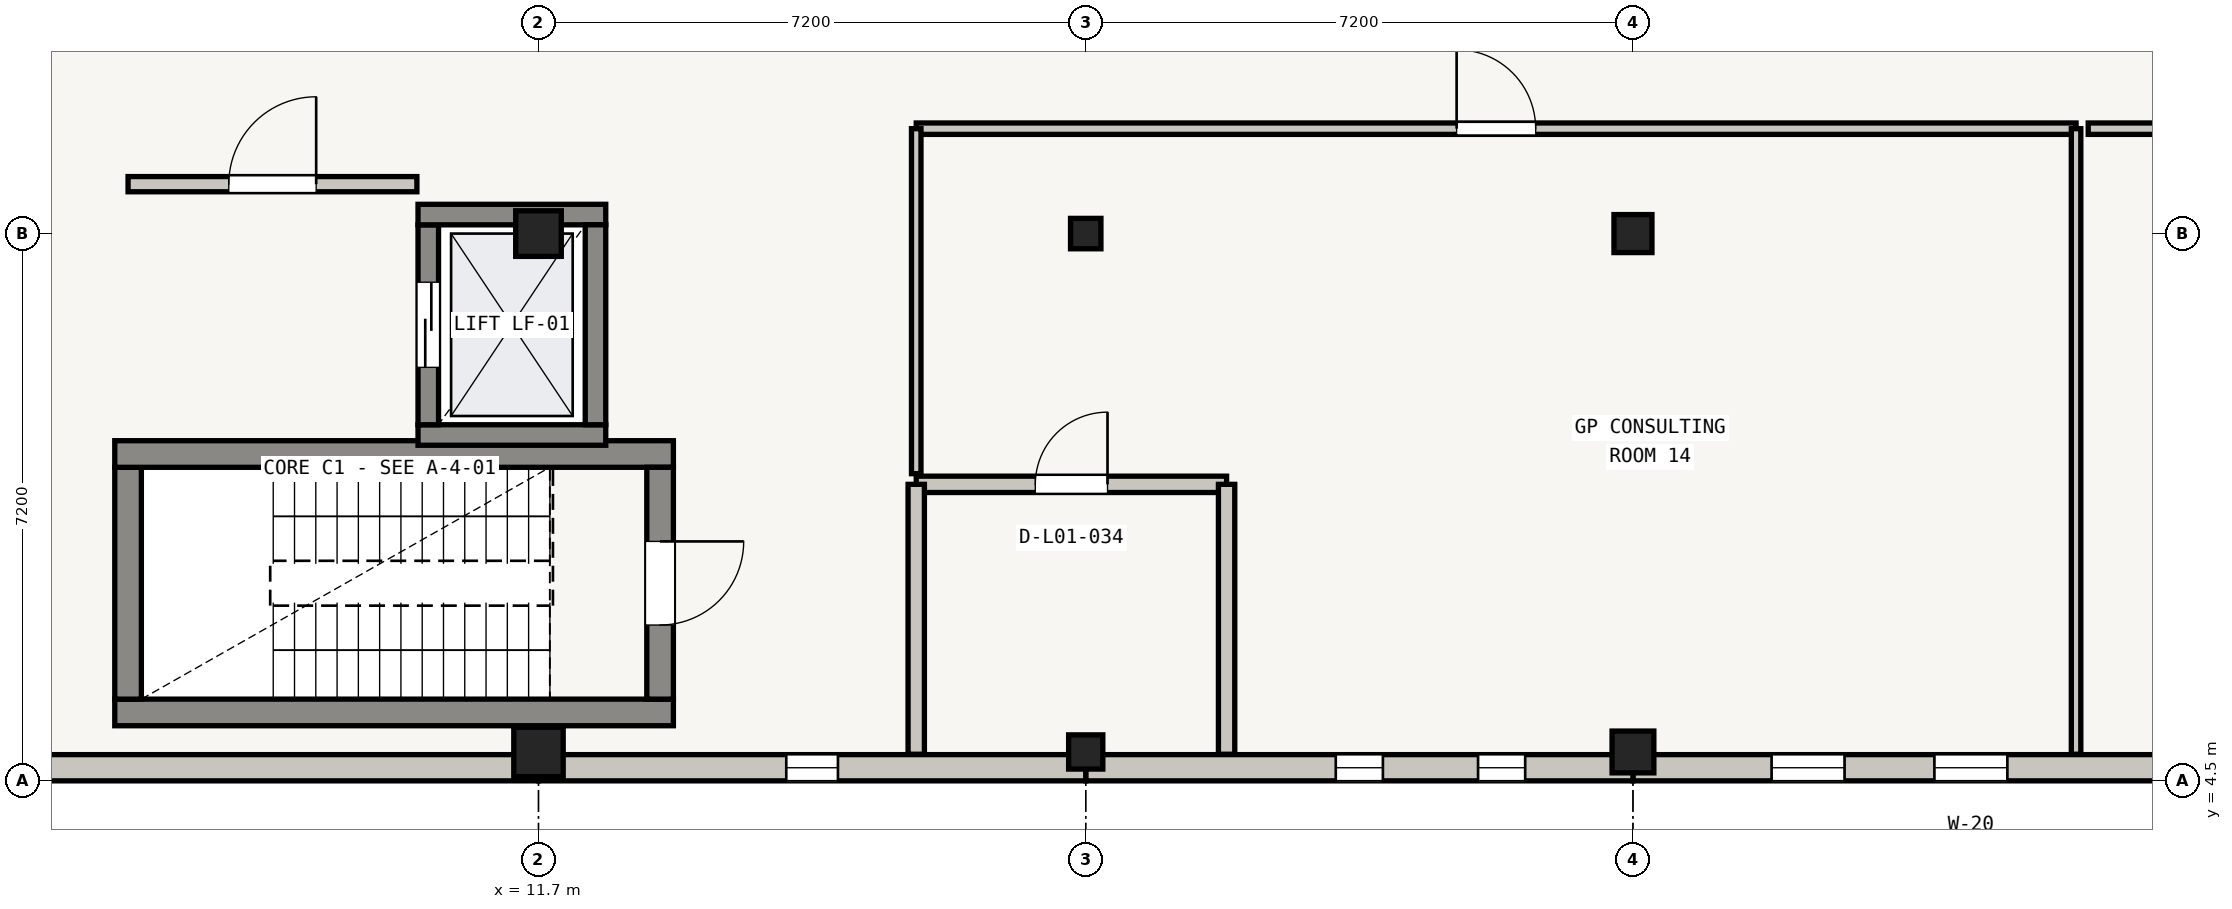
"""IFC4 building model, lengths in metres.
Left out: names, types, materials, properties, quantities, classifications, styles, units other than length and angle.
Written with IfcOpenShell. Run it as: python <this file> out.ifc"""

import sys

from ifc_helpers import new_model, si_unit, direction, frame, frame_2d, origin, origin_2d, place, context, subcontext, project, spatial, rectangle, extrude, element, fill, save


model = new_model("IFC4")
c1 = context("Model", 3, precision=1e-05, world=origin(), true_north=direction((0.0, 1.0)))
c2 = subcontext(c1, "Body", "Model", "MODEL_VIEW")
j1 = project(units=[si_unit("LENGTHUNIT", "METRE"), si_unit("PLANEANGLEUNIT", "RADIAN")], contexts=[c1])
p1 = place(None, origin())
s1 = spatial("IfcSite", under=j1, at=p1, CompositionType="ELEMENT")
p2 = place(p1, origin())
s2 = spatial("IfcBuilding", under=s1, at=p2, CompositionType="ELEMENT")
p3 = place(p2, frame((0.0, 0.0, 4.5)))
s3 = spatial("IfcBuildingStorey", under=s2, at=p3, CompositionType="ELEMENT", Elevation=4.5)
p4 = place(p3, frame((11.7, 4.88, 0.0), z_axis=(0.0, 0.0, 1.0), x_axis=(1.0, 0.0, 0.0)))
e1 = element("IfcColumn", 1, at=p4, inside=s3, PredefinedType="COLUMN", context=c2, shape_type="SweptSolid", body=[
    extrude(rectangle(XDim=0.65, YDim=0.65, at=origin_2d()), origin(), (0.0, 0.0, 1.0), 3.92),
])
p5 = place(p3, frame((11.7, 11.7, 0.0), z_axis=(0.0, 0.0, 1.0), x_axis=(1.0, 0.0, 0.0)))
e2 = element("IfcColumn", 2, at=p5, inside=s3, PredefinedType="COLUMN", context=c2, shape_type="SweptSolid", body=[
    extrude(rectangle(XDim=0.6, YDim=0.6, at=origin_2d()), origin(), (0.0, 0.0, 1.0), 3.92),
])
p6 = place(p3, frame((18.9, 4.88, 0.0), z_axis=(0.0, 0.0, 1.0), x_axis=(1.0, 0.0, 0.0)))
e3 = element("IfcColumn", 3, at=p6, inside=s3, PredefinedType="COLUMN", context=c2, shape_type="SweptSolid", body=[
    extrude(rectangle(XDim=0.45, YDim=0.45, at=origin_2d()), origin(), (0.0, 0.0, 1.0), 3.92),
])
p7 = place(p3, frame((18.9, 11.7, 0.0), z_axis=(0.0, 0.0, 1.0), x_axis=(1.0, 0.0, 0.0)))
e4 = element("IfcColumn", 4, at=p7, inside=s3, PredefinedType="COLUMN", context=c2, shape_type="SweptSolid", body=[
    extrude(rectangle(XDim=0.4, YDim=0.4, at=origin_2d()), origin(), (0.0, 0.0, 1.0), 3.92),
])
p8 = place(p3, frame((26.1, 4.88, 0.0), z_axis=(0.0, 0.0, 1.0), x_axis=(1.0, 0.0, 0.0)))
e5 = element("IfcColumn", 5, at=p8, inside=s3, PredefinedType="COLUMN", context=c2, shape_type="SweptSolid", body=[
    extrude(rectangle(XDim=0.55, YDim=0.55, at=origin_2d()), origin(), (0.0, 0.0, 1.0), 3.92),
])
p9 = place(p3, frame((26.1, 11.7, 0.0), z_axis=(0.0, 0.0, 1.0), x_axis=(1.0, 0.0, 0.0)))
e6 = element("IfcColumn", 6, at=p9, inside=s3, PredefinedType="COLUMN", context=c2, shape_type="SweptSolid", body=[
    extrude(rectangle(XDim=0.5, YDim=0.5, at=origin_2d()), origin(), (0.0, 0.0, 1.0), 3.92),
])
p10 = place(p3, frame((33.3, 4.673, 0.0), z_axis=(0.0, 0.0, 1.0), x_axis=(-1.0, 0.0, 0.0)))
e7 = element("IfcWall", 7, at=p10, inside=s3, PredefinedType="SOLIDWALL", context=c2, shape_type="SweptSolid", body=[
    extrude(rectangle(XDim=7.2, YDim=0.345, at=frame_2d((3.6, 0.0))), origin(), (0.0, 0.0, 1.0), 3.185),
])
p11 = place(p10, frame((2.274, 0.0, 0.55)))
e8 = element("IfcOpeningElement", 8, at=p11, cuts=e7, PredefinedType="OPENING", context=c2, shape_type="SweptSolid", body=[
    extrude(rectangle(XDim=0.96, YDim=2.1, at=frame_2d((0.48, 1.05))), frame((0.0, 0.172, 0.0), z_axis=(0.0, -1.0, 0.0), x_axis=(1.0, 0.0, 0.0)), (0.0, 0.0, 1.0), 0.345),
])
p12 = place(p10, frame((4.416, 0.0, 0.55)))
e9 = element("IfcOpeningElement", 9, at=p12, cuts=e7, PredefinedType="OPENING", context=c2, shape_type="SweptSolid", body=[
    extrude(rectangle(XDim=0.96, YDim=2.1, at=frame_2d((0.48, 1.05))), frame((0.0, 0.172, 0.0), z_axis=(0.0, -1.0, 0.0), x_axis=(1.0, 0.0, 0.0)), (0.0, 0.0, 1.0), 0.345),
])
p13 = place(p3, frame((26.1, 4.673, 0.0), z_axis=(0.0, 0.0, 1.0), x_axis=(-1.0, 0.0, 0.0)))
e10 = element("IfcWall", 10, at=p13, inside=s3, PredefinedType="SOLIDWALL", context=c2, shape_type="SweptSolid", body=[
    extrude(rectangle(XDim=7.2, YDim=0.345, at=frame_2d((3.6, 0.0))), origin(), (0.0, 0.0, 1.0), 3.185),
])
p14 = place(p13, frame((1.418, 0.0, 0.55)))
e11 = element("IfcOpeningElement", 11, at=p14, cuts=e10, PredefinedType="OPENING", context=c2, shape_type="SweptSolid", body=[
    extrude(rectangle(XDim=0.62, YDim=2.08, at=frame_2d((0.31, 1.04))), frame((0.0, 0.172, 0.0), z_axis=(0.0, -1.0, 0.0), x_axis=(1.0, 0.0, 0.0)), (0.0, 0.0, 1.0), 0.345),
])
p15 = place(p13, frame((3.29, 0.0, 0.55)))
e12 = element("IfcOpeningElement", 12, at=p15, cuts=e10, PredefinedType="OPENING", context=c2, shape_type="SweptSolid", body=[
    extrude(rectangle(XDim=0.62, YDim=2.08, at=frame_2d((0.31, 1.04))), frame((0.0, 0.172, 0.0), z_axis=(0.0, -1.0, 0.0), x_axis=(1.0, 0.0, 0.0)), (0.0, 0.0, 1.0), 0.345),
])
p16 = place(p3, frame((18.9, 4.673, 0.0), z_axis=(0.0, 0.0, 1.0), x_axis=(-1.0, 0.0, 0.0)))
e13 = element("IfcWall", 13, at=p16, inside=s3, PredefinedType="SOLIDWALL", context=c2, shape_type="SweptSolid", body=[
    extrude(rectangle(XDim=7.2, YDim=0.345, at=frame_2d((3.6, 0.0))), origin(), (0.0, 0.0, 1.0), 3.185),
])
p17 = place(p16, frame((3.26, 0.0, 0.55)))
e14 = element("IfcOpeningElement", 14, at=p17, cuts=e13, PredefinedType="OPENING", context=c2, shape_type="SweptSolid", body=[
    extrude(rectangle(XDim=0.68, YDim=2.08, at=frame_2d((0.34, 1.04))), frame((0.0, 0.172, 0.0), z_axis=(0.0, -1.0, 0.0), x_axis=(1.0, 0.0, 0.0)), (0.0, 0.0, 1.0), 0.345),
])
p18 = place(p3, frame((11.7, 4.673, 0.0), z_axis=(0.0, 0.0, 1.0), x_axis=(-1.0, 0.0, 0.0)))
e15 = element("IfcWall", 15, at=p18, inside=s3, PredefinedType="SOLIDWALL", context=c2, shape_type="SweptSolid", body=[
    extrude(rectangle(XDim=7.2, YDim=0.345, at=frame_2d((3.6, 0.0))), origin(), (0.0, 0.0, 1.0), 3.405),
])
p19 = place(p3, frame((13.475, 5.4, 0.0), z_axis=(0.0, 0.0, 1.0), x_axis=(-1.0, 0.0, 0.0)))
e16 = element("IfcWall", 16, at=p19, inside=s3, PredefinedType="SHEAR", context=c2, shape_type="SweptSolid", body=[
    extrude(rectangle(XDim=7.35, YDim=0.35, at=frame_2d((3.675, 0.0))), origin(), (0.0, 0.0, 1.0), 3.92),
])
p20 = place(p3, frame((6.3, 5.575, 0.0), z_axis=(0.0, 0.0, 1.0), x_axis=(0.0, 1.0, 0.0)))
e17 = element("IfcWall", 17, at=p20, inside=s3, PredefinedType="SHEAR", context=c2, shape_type="SweptSolid", body=[
    extrude(rectangle(XDim=3.05, YDim=0.35, at=frame_2d((1.525, 0.0))), origin(), (0.0, 0.0, 1.0), 3.92),
])
p21 = place(p3, frame((6.125, 8.8, 0.0), z_axis=(0.0, 0.0, 1.0), x_axis=(1.0, 0.0, 0.0)))
e18 = element("IfcWall", 18, at=p21, inside=s3, PredefinedType="SHEAR", context=c2, shape_type="SweptSolid", body=[
    extrude(rectangle(XDim=7.35, YDim=0.35, at=frame_2d((3.675, 0.0))), origin(), (0.0, 0.0, 1.0), 3.92),
])
p22 = place(p3, frame((13.3, 8.625, 0.0), z_axis=(0.0, 0.0, 1.0), x_axis=(0.0, -1.0, 0.0)))
e19 = element("IfcWall", 19, at=p22, inside=s3, PredefinedType="SHEAR", context=c2, shape_type="SweptSolid", body=[
    extrude(rectangle(XDim=3.05, YDim=0.35, at=frame_2d((1.525, 0.0))), origin(), (0.0, 0.0, 1.0), 3.92),
])
p23 = place(p22, frame((0.975, 0.0, 0.0)))
e20 = element("IfcOpeningElement", 20, at=p23, cuts=e19, PredefinedType="OPENING", context=c2, shape_type="SweptSolid", body=[
    extrude(rectangle(XDim=1.1, YDim=2.05, at=frame_2d((0.55, 1.025))), frame((0.0, 0.175, 0.0), z_axis=(0.0, -1.0, 0.0), x_axis=(1.0, 0.0, 0.0)), (0.0, 0.0, 1.0), 0.35),
])
p24 = place(p3, frame((12.585, 9.05, 0.0), z_axis=(0.0, 0.0, 1.0), x_axis=(-1.0, 0.0, 0.0)))
e21 = element("IfcWall", 21, at=p24, inside=s3, PredefinedType="SHEAR", context=c2, shape_type="SweptSolid", body=[
    extrude(rectangle(XDim=2.47, YDim=0.27, at=frame_2d((1.235, 0.0))), origin(), (0.0, 0.0, 1.0), 3.92),
])
p25 = place(p3, frame((10.25, 9.185, 0.0), z_axis=(0.0, 0.0, 1.0), x_axis=(0.0, 1.0, 0.0)))
e22 = element("IfcWall", 22, at=p25, inside=s3, PredefinedType="SHEAR", context=c2, shape_type="SweptSolid", body=[
    extrude(rectangle(XDim=2.63, YDim=0.27, at=frame_2d((1.315, 0.0))), origin(), (0.0, 0.0, 1.0), 3.92),
])
p26 = place(p25, frame((0.755, 0.0, 0.0)))
e23 = element("IfcOpeningElement", 23, at=p26, cuts=e22, PredefinedType="OPENING", context=c2, shape_type="SweptSolid", body=[
    extrude(rectangle(XDim=1.12, YDim=2.1, at=frame_2d((0.56, 1.05))), frame((0.0, 0.135, 0.0), z_axis=(0.0, -1.0, 0.0), x_axis=(1.0, 0.0, 0.0)), (0.0, 0.0, 1.0), 0.27),
])
p27 = place(p3, frame((10.115, 11.95, 0.0), z_axis=(0.0, 0.0, 1.0), x_axis=(1.0, 0.0, 0.0)))
e24 = element("IfcWall", 24, at=p27, inside=s3, PredefinedType="SHEAR", context=c2, shape_type="SweptSolid", body=[
    extrude(rectangle(XDim=2.47, YDim=0.27, at=frame_2d((1.235, 0.0))), origin(), (0.0, 0.0, 1.0), 3.92),
])
p28 = place(p3, frame((12.45, 11.815, 0.0), z_axis=(0.0, 0.0, 1.0), x_axis=(0.0, -1.0, 0.0)))
e25 = element("IfcWall", 25, at=p28, inside=s3, PredefinedType="SHEAR", context=c2, shape_type="SweptSolid", body=[
    extrude(rectangle(XDim=2.63, YDim=0.27, at=frame_2d((1.315, 0.0))), origin(), (0.0, 0.0, 1.0), 3.92),
])
p29 = place(p3, frame((6.3, 12.35, 0.0), z_axis=(0.0, 0.0, 1.0), x_axis=(1.0, 0.0, 0.0)))
e26 = element("IfcWall", 26, at=p29, inside=s3, PredefinedType="SOLIDWALL", context=c2, shape_type="SweptSolid", body=[
    extrude(rectangle(XDim=3.8, YDim=0.2, at=frame_2d((1.9, 0.0))), origin(), (0.0, 0.0, 1.0), 2.94),
])
p30 = place(p29, frame((1.325, 0.0, 0.0)))
e27 = element("IfcOpeningElement", 27, at=p30, cuts=e26, PredefinedType="OPENING", context=c2, shape_type="SweptSolid", body=[
    extrude(rectangle(XDim=1.15, YDim=2.05, at=frame_2d((0.575, 1.025))), frame((0.0, 0.1, 0.0), z_axis=(0.0, -1.0, 0.0), x_axis=(1.0, 0.0, 0.0)), (0.0, 0.0, 1.0), 0.2),
])
p31 = place(p3, frame((16.67, 8.401, 0.0), z_axis=(0.0, 0.0, 1.0), x_axis=(1.0, 0.0, 0.0)))
e28 = element("IfcWall", 28, at=p31, inside=s3, PredefinedType="PLUMBINGWALL", context=c2, shape_type="SweptSolid", body=[
    extrude(rectangle(XDim=4.083, YDim=0.215, at=frame_2d((2.042, 0.0))), origin(), (0.0, 0.0, 1.0), 2.94),
])
p32 = place(p31, frame((1.567, 0.0, 0.0)))
e29 = element("IfcOpeningElement", 29, at=p32, cuts=e28, PredefinedType="OPENING", context=c2, shape_type="SweptSolid", body=[
    extrude(rectangle(XDim=0.95, YDim=2.05, at=frame_2d((0.475, 1.025))), frame((0.0, 0.107, 0.0), z_axis=(0.0, -1.0, 0.0), x_axis=(1.0, 0.0, 0.0)), (0.0, 0.0, 1.0), 0.215),
])
for number, where, z_axis, x_axis in (
    (30, (20.753, 8.401, 0.0), (0.0, 0.0, 1.0), (0.0, -1.0, 0.0)),
    (31, (16.67, 4.85, 0.0), (0.0, 0.0, 1.0), (0.0, 1.0, 0.0)),
):
    element("IfcWall", number, at=place(p3, frame(where, z_axis=z_axis, x_axis=x_axis)), inside=s3, PredefinedType="PLUMBINGWALL", context=c2, shape_type="SweptSolid", body=[
        extrude(rectangle(XDim=3.551, YDim=0.215, at=frame_2d((1.775, 0.0))), origin(), (0.0, 0.0, 1.0), 2.94),
    ])
p33 = place(p3, frame((16.67, 13.08, 0.0), z_axis=(0.0, 0.0, 1.0), x_axis=(1.0, 0.0, 0.0)))
e32 = element("IfcWall", 32, at=p33, inside=s3, PredefinedType="PARTITIONING", context=c2, shape_type="SweptSolid", body=[
    extrude(rectangle(XDim=15.26, YDim=0.15, at=frame_2d((7.63, 0.0))), origin(), (0.0, 0.0, 1.0), 2.94),
])
p34 = place(p33, frame((7.11, 0.0, 0.0)))
e33 = element("IfcOpeningElement", 33, at=p34, cuts=e32, PredefinedType="OPENING", context=c2, shape_type="SweptSolid", body=[
    extrude(rectangle(XDim=1.04, YDim=2.05, at=frame_2d((0.52, 1.025))), frame((0.0, 0.075, 0.0), z_axis=(0.0, -1.0, 0.0), x_axis=(1.0, 0.0, 0.0)), (0.0, 0.0, 1.0), 0.15),
])
p35 = place(p3, frame((31.93, 13.08, 0.0), z_axis=(0.0, 0.0, 1.0), x_axis=(0.0, -1.0, 0.0)))
e34 = element("IfcWall", 34, at=p35, inside=s3, PredefinedType="PARTITIONING", context=c2, shape_type="SweptSolid", body=[
    extrude(rectangle(XDim=8.23, YDim=0.125, at=frame_2d((4.115, 0.0))), origin(), (0.0, 0.0, 1.0), 2.94),
])
p36 = place(p3, frame((16.67, 8.541, 0.0), z_axis=(0.0, 0.0, 1.0), x_axis=(0.0, 1.0, 0.0)))
e35 = element("IfcWall", 35, at=p36, inside=s3, PredefinedType="PARTITIONING", context=c2, shape_type="SweptSolid", body=[
    extrude(rectangle(XDim=4.539, YDim=0.125, at=frame_2d((2.27, 0.0))), origin(), (0.0, 0.0, 1.0), 2.94),
])
p37 = place(p3, frame((32.09, 13.08, 0.0), z_axis=(0.0, 0.0, 1.0), x_axis=(1.0, 0.0, 0.0)))
e36 = element("IfcWall", 36, at=p37, inside=s3, PredefinedType="PARTITIONING", context=c2, shape_type="SweptSolid", body=[
    extrude(rectangle(XDim=11.036, YDim=0.15, at=frame_2d((5.518, 0.0))), origin(), (0.0, 0.0, 1.0), 2.94),
])
p38 = place(p37, frame((5.018, 0.0, 0.0)))
e37 = element("IfcOpeningElement", 37, at=p38, cuts=e36, PredefinedType="OPENING", context=c2, shape_type="SweptSolid", body=[
    extrude(rectangle(XDim=1.0, YDim=2.05, at=frame_2d((0.5, 1.025))), frame((0.0, 0.075, 0.0), z_axis=(0.0, -1.0, 0.0), x_axis=(1.0, 0.0, 0.0)), (0.0, 0.0, 1.0), 0.15),
])
p39 = place(p11, origin())
e38 = element("IfcWindow", 38, at=p39, inside=s3, PartitioningType="DOUBLE_PANEL_VERTICAL", PredefinedType="WINDOW", context=c2, shape_type="SweptSolid", body=[
    extrude(rectangle(XDim=0.96, YDim=2.1, at=frame_2d((0.48, 1.05))), frame((0.0, 0.03, 0.0), z_axis=(0.0, -1.0, 0.0), x_axis=(1.0, 0.0, 0.0)), (0.0, 0.0, 1.0), 0.06),
])
fill(e8, e38)
p40 = place(p12, origin())
e39 = element("IfcWindow", 39, at=p40, inside=s3, PartitioningType="DOUBLE_PANEL_VERTICAL", PredefinedType="WINDOW", context=c2, shape_type="SweptSolid", body=[
    extrude(rectangle(XDim=0.96, YDim=2.1, at=frame_2d((0.48, 1.05))), frame((0.0, 0.03, 0.0), z_axis=(0.0, -1.0, 0.0), x_axis=(1.0, 0.0, 0.0)), (0.0, 0.0, 1.0), 0.06),
])
fill(e9, e39)
p41 = place(p14, origin())
e40 = element("IfcWindow", 40, at=p41, inside=s3, PartitioningType="SINGLE_PANEL", PredefinedType="WINDOW", context=c2, shape_type="SweptSolid", body=[
    extrude(rectangle(XDim=0.62, YDim=2.08, at=frame_2d((0.31, 1.04))), frame((0.0, 0.03, 0.0), z_axis=(0.0, -1.0, 0.0), x_axis=(1.0, 0.0, 0.0)), (0.0, 0.0, 1.0), 0.06),
])
fill(e11, e40)
p42 = place(p15, origin())
e41 = element("IfcWindow", 41, at=p42, inside=s3, PartitioningType="SINGLE_PANEL", PredefinedType="WINDOW", context=c2, shape_type="SweptSolid", body=[
    extrude(rectangle(XDim=0.62, YDim=2.08, at=frame_2d((0.31, 1.04))), frame((0.0, 0.03, 0.0), z_axis=(0.0, -1.0, 0.0), x_axis=(1.0, 0.0, 0.0)), (0.0, 0.0, 1.0), 0.06),
])
fill(e12, e41)
p43 = place(p17, origin())
e42 = element("IfcWindow", 42, at=p43, inside=s3, PartitioningType="SINGLE_PANEL", PredefinedType="WINDOW", context=c2, shape_type="SweptSolid", body=[
    extrude(rectangle(XDim=0.68, YDim=2.08, at=frame_2d((0.34, 1.04))), frame((0.0, 0.03, 0.0), z_axis=(0.0, -1.0, 0.0), x_axis=(1.0, 0.0, 0.0)), (0.0, 0.0, 1.0), 0.06),
])
fill(e14, e42)
p44 = place(p23, origin())
e43 = element("IfcDoor", 43, at=p44, inside=s3, OperationType="SINGLE_SWING_LEFT", PredefinedType="DOOR", context=c2, shape_type="SweptSolid", body=[
    extrude(rectangle(XDim=1.1, YDim=2.05, at=frame_2d((0.55, 1.025))), frame((0.0, 0.025, 0.0), z_axis=(0.0, -1.0, 0.0), x_axis=(1.0, 0.0, 0.0)), (0.0, 0.0, 1.0), 0.05),
])
fill(e20, e43)
p45 = place(p26, origin())
e44 = element("IfcDoor", 44, at=p45, inside=s3, OperationType="DOUBLE_DOOR_SLIDING", PredefinedType="DOOR", context=c2, shape_type="SweptSolid", body=[
    extrude(rectangle(XDim=1.12, YDim=2.1, at=frame_2d((0.56, 1.05))), frame((0.0, 0.025, 0.0), z_axis=(0.0, -1.0, 0.0), x_axis=(1.0, 0.0, 0.0)), (0.0, 0.0, 1.0), 0.05),
])
fill(e23, e44)
p46 = place(p30, origin())
e45 = element("IfcDoor", 45, at=p46, inside=s3, OperationType="SINGLE_SWING_RIGHT", PredefinedType="DOOR", context=c2, shape_type="SweptSolid", body=[
    extrude(rectangle(XDim=1.15, YDim=2.05, at=frame_2d((0.575, 1.025))), frame((0.0, 0.025, 0.0), z_axis=(0.0, -1.0, 0.0), x_axis=(1.0, 0.0, 0.0)), (0.0, 0.0, 1.0), 0.05),
])
fill(e27, e45)
p47 = place(p32, origin())
e46 = element("IfcDoor", 46, at=p47, inside=s3, OperationType="SINGLE_SWING_RIGHT", PredefinedType="DOOR", context=c2, shape_type="SweptSolid", body=[
    extrude(rectangle(XDim=0.95, YDim=2.05, at=frame_2d((0.475, 1.025))), frame((0.0, 0.025, 0.0), z_axis=(0.0, -1.0, 0.0), x_axis=(1.0, 0.0, 0.0)), (0.0, 0.0, 1.0), 0.05),
])
fill(e29, e46)
p48 = place(p34, origin())
e47 = element("IfcDoor", 47, at=p48, inside=s3, OperationType="SINGLE_SWING_LEFT", PredefinedType="DOOR", context=c2, shape_type="SweptSolid", body=[
    extrude(rectangle(XDim=1.04, YDim=2.05, at=frame_2d((0.52, 1.025))), frame((0.0, 0.025, 0.0), z_axis=(0.0, -1.0, 0.0), x_axis=(1.0, 0.0, 0.0)), (0.0, 0.0, 1.0), 0.05),
])
fill(e33, e47)
save(model, sys.argv[1])
